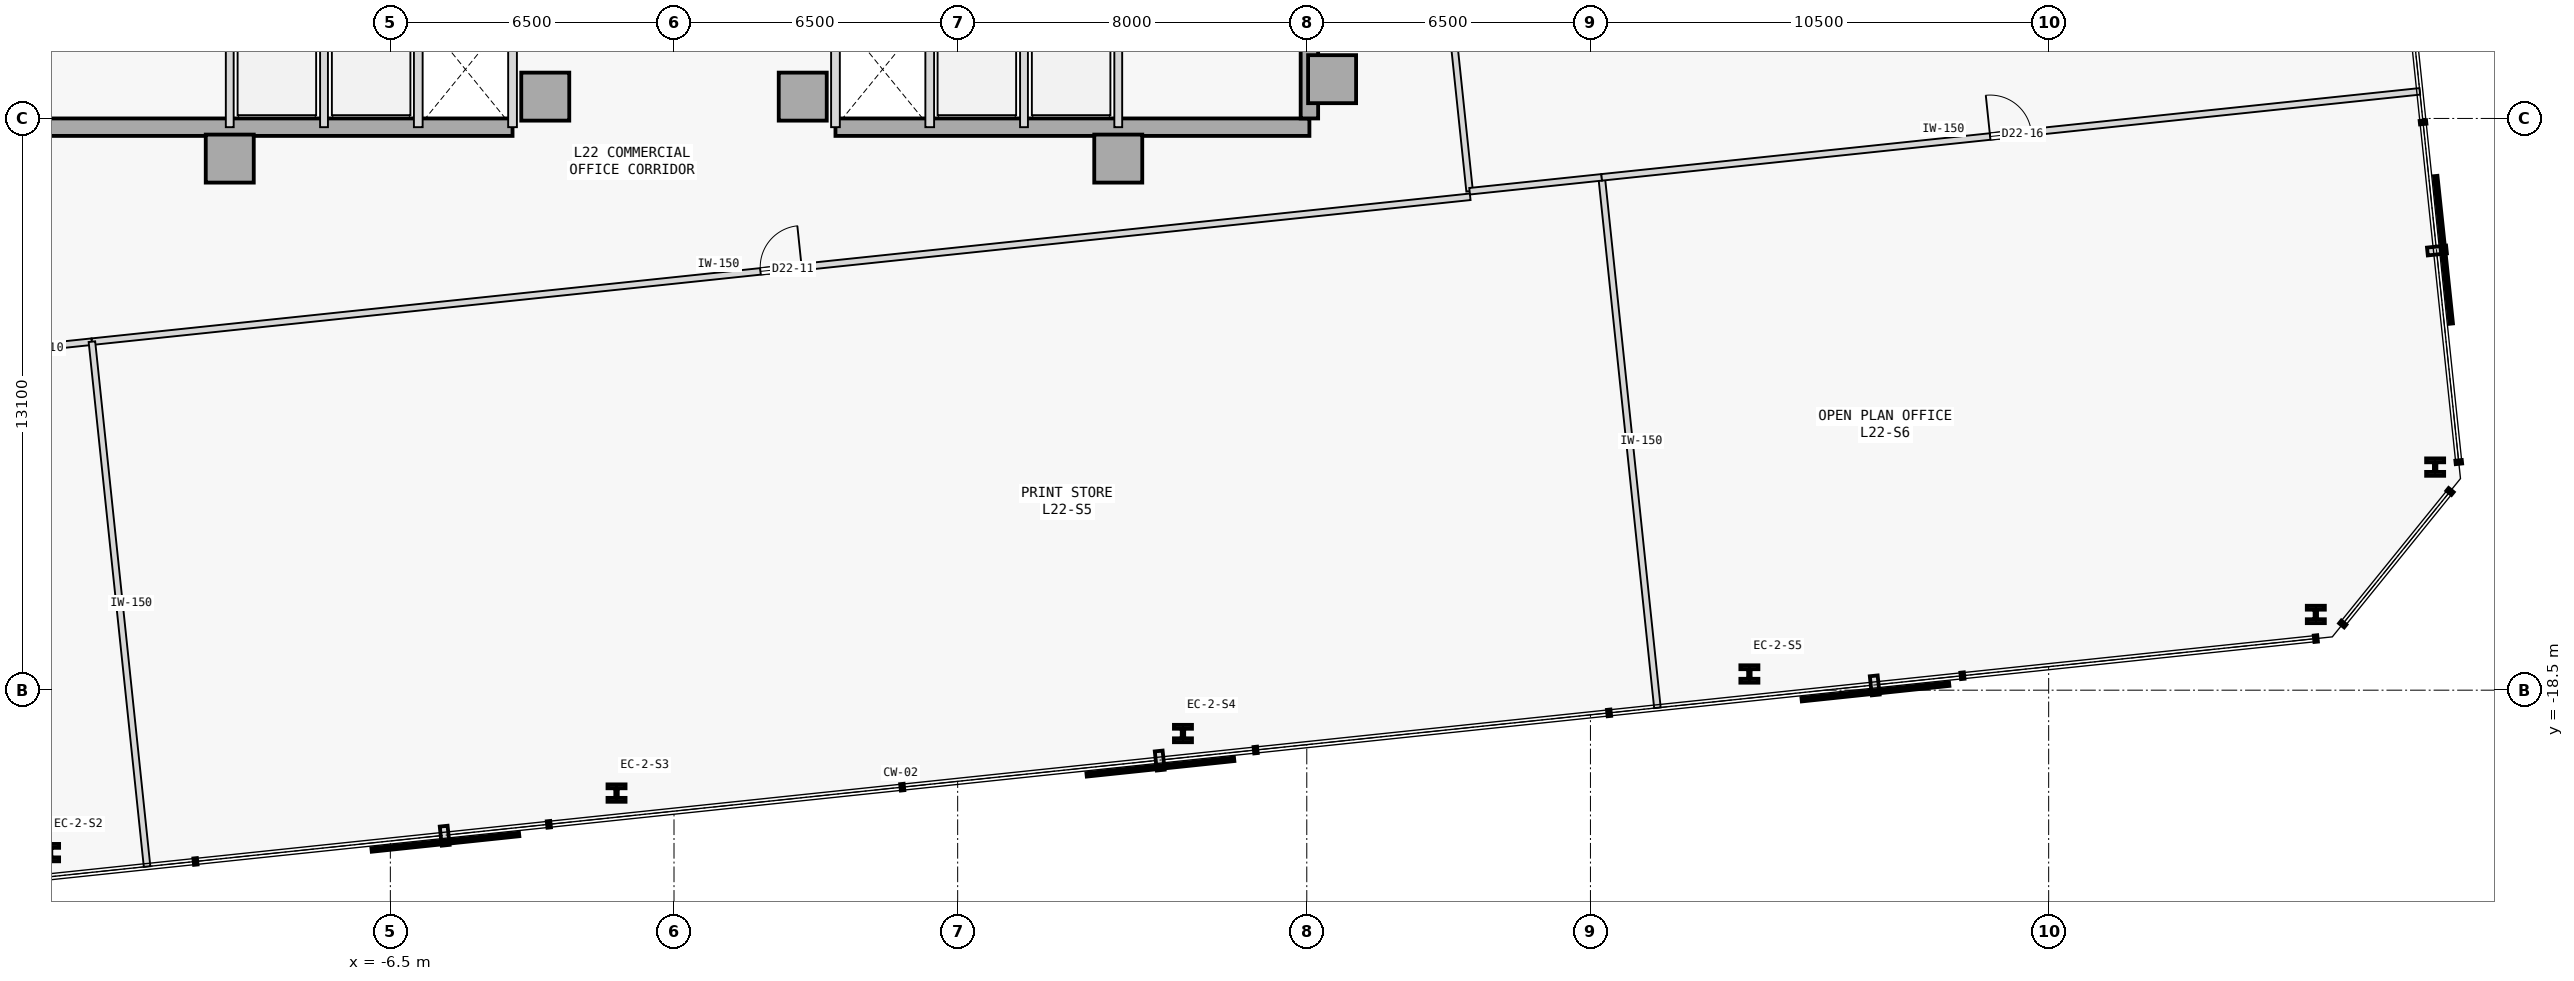
"""IFC4 building model, lengths in metres.
Left out: names, types, materials, properties, quantities, classifications, styles, units other than length and angle.
Written with IfcOpenShell. Run it as: python <this file> out.ifc"""

import sys

from ifc_helpers import new_model, si_unit, direction, frame, frame_2d, origin, origin_2d, place, context, subcontext, project, spatial, rectangle, i_section, extrude, element, fill, save


model = new_model("IFC4")
c1 = context("Model", 3, precision=1e-05, world=origin(), true_north=direction((0.0, 1.0)))
c2 = subcontext(c1, "Body", "Model", "MODEL_VIEW")
j1 = project(units=[si_unit("LENGTHUNIT", "METRE"), si_unit("PLANEANGLEUNIT", "RADIAN")], contexts=[c1])
p1 = place(None, origin())
s1 = spatial("IfcSite", under=j1, at=p1, CompositionType="ELEMENT")
p2 = place(p1, origin())
s2 = spatial("IfcBuilding", under=s1, at=p2, CompositionType="ELEMENT")
p3 = place(p2, frame((0.0, 0.0, 91.1)))
s3 = spatial("IfcBuildingStorey", under=s2, at=p3, CompositionType="ELEMENT", Elevation=91.1)
for number, where, z_axis, x_axis in (
    (1, (-10.18, -6.32, 0.0), (0.0, 0.0, 1.0), (1.0, 0.0, 0.0)),
    (2, (-2.95, -4.9, 0.0), (0.0, 0.0, 1.0), (1.0, 0.0, 0.0)),
    (3, (15.08, -4.5, 0.0), (0.0, 0.0, 1.0), (1.0, 0.0, 0.0)),
    (4, (10.18, -6.32, 0.0), (0.0, 0.0, 1.0), (1.0, 0.0, 0.0)),
    (5, (2.95, -4.9, 0.0), (0.0, 0.0, 1.0), (1.0, 0.0, 0.0)),
):
    element("IfcColumn", number, at=place(p3, frame(where, z_axis=z_axis, x_axis=x_axis)), inside=s3, PredefinedType="COLUMN", context=c2, shape_type="SweptSolid", body=[
        extrude(rectangle(XDim=1.1, YDim=1.1, at=origin_2d()), origin(), (0.0, 0.0, 1.0), 3.7),
    ])
for number, where, z_axis, x_axis in (
    (6, (-14.56, -5.6, 0.0), (0.0, 0.0, 1.0), (1.0, 0.0, 0.0)),
    (7, (3.7, -5.6, 0.0), (0.0, 0.0, 1.0), (1.0, 0.0, 0.0)),
):
    element("IfcWall", number, at=place(p3, frame(where, z_axis=z_axis, x_axis=x_axis)), inside=s3, PredefinedType="SHEAR", context=c2, shape_type="SweptSolid", body=[
        extrude(rectangle(XDim=10.86, YDim=0.4, at=frame_2d((5.43, 0.0))), origin(), (0.0, 0.0, 1.0), 3.475),
    ])
p4 = place(p3, frame((14.56, -5.4, 0.0), z_axis=(0.0, 0.0, 1.0), x_axis=(0.0, 1.0, 0.0)))
e8 = element("IfcWall", 8, at=p4, inside=s3, PredefinedType="SHEAR", context=c2, shape_type="SweptSolid", body=[
    extrude(rectangle(XDim=10.8, YDim=0.4, at=frame_2d((5.4, 0.0))), origin(), (0.0, 0.0, 1.0), 3.475),
])
for number, where, z_axis, x_axis in (
    (9, (-14.297, -22.222, 0.0), (0.0, 0.0, 1.0), (1.0, 0.0, 0.0)),
    (10, (-1.317, -20.858, 0.0), (0.0, 0.0, 1.0), (1.0, 0.0, 0.0)),
    (11, (11.663, -19.494, 0.0), (0.0, 0.0, 1.0), (1.0, 0.0, 0.0)),
    (12, (24.642, -18.129, 0.0), (0.0, 0.0, 1.0), (1.0, 0.0, 0.0)),
    (13, (37.622, -16.765, 0.0), (0.0, 0.0, 1.0), (1.0, 0.0, 0.0)),
    (14, (40.356, -13.389, 0.0), (0.0, 0.0, 1.0), (1.0, 0.0, 0.0)),
):
    element("IfcColumn", number, at=place(p3, frame(where, z_axis=z_axis, x_axis=x_axis)), inside=s3, PredefinedType="COLUMN", context=c2, shape_type="SweptSolid", body=[
        extrude(i_section(OverallWidth=0.413, OverallDepth=0.398, WebThickness=0.056, FlangeThickness=0.089, FilletRadius=0.015, at=origin_2d()), origin(), (0.0, 0.0, 1.0), 3.7),
    ])
for number, where, z_axis, x_axis in (
    (15, (-3.7, -5.6, 0.0), (0.0, 0.0, 1.0), (0.0, 1.0, 0.0)),
    (16, (-5.86, -5.6, 0.0), (0.0, 0.0, 1.0), (0.0, 1.0, 0.0)),
):
    element("IfcWall", number, at=place(p3, frame(where, z_axis=z_axis, x_axis=x_axis)), inside=s3, PredefinedType="STANDARD", context=c2, shape_type="SweptSolid", body=[
        extrude(rectangle(XDim=2.65, YDim=0.2, at=frame_2d((1.325, 0.0))), origin(), (0.0, 0.0, 1.0), 3.475),
    ])
for number, where, z_axis, x_axis in (
    (17, (-10.18, -5.6, 0.0), (0.0, 0.0, 1.0), (0.0, 1.0, 0.0)),
    (18, (-8.02, -5.6, 0.0), (0.0, 0.0, 1.0), (0.0, 1.0, 0.0)),
):
    element("IfcWall", number, at=place(p3, frame(where, z_axis=z_axis, x_axis=x_axis)), inside=s3, PredefinedType="STANDARD", context=c2, shape_type="SweptSolid", body=[
        extrude(rectangle(XDim=2.65, YDim=0.18, at=frame_2d((1.325, 0.0))), origin(), (0.0, 0.0, 1.0), 3.475),
    ])
for number, where, z_axis, x_axis in (
    (19, (3.7, -5.6, 0.0), (0.0, 0.0, 1.0), (0.0, 1.0, 0.0)),
    (20, (5.86, -5.6, 0.0), (0.0, 0.0, 1.0), (0.0, 1.0, 0.0)),
):
    element("IfcWall", number, at=place(p3, frame(where, z_axis=z_axis, x_axis=x_axis)), inside=s3, PredefinedType="STANDARD", context=c2, shape_type="SweptSolid", body=[
        extrude(rectangle(XDim=2.65, YDim=0.2, at=frame_2d((1.325, 0.0))), origin(), (0.0, 0.0, 1.0), 3.475),
    ])
for number, where, z_axis, x_axis in (
    (21, (10.18, -5.6, 0.0), (0.0, 0.0, 1.0), (0.0, 1.0, 0.0)),
    (22, (8.02, -5.6, 0.0), (0.0, 0.0, 1.0), (0.0, 1.0, 0.0)),
):
    element("IfcWall", number, at=place(p3, frame(where, z_axis=z_axis, x_axis=x_axis)), inside=s3, PredefinedType="STANDARD", context=c2, shape_type="SweptSolid", body=[
        extrude(rectangle(XDim=2.65, YDim=0.18, at=frame_2d((1.325, 0.0))), origin(), (0.0, 0.0, 1.0), 3.475),
    ])
p5 = place(p3, frame((-16.14, -10.809, 0.0), z_axis=(0.0, 0.0, 1.0), x_axis=(0.994522535937, 0.104522368483, 0.0)))
e23 = element("IfcWall", 23, at=p5, inside=s3, PredefinedType="PARTITIONING", context=c2, shape_type="SweptSolid", body=[
    extrude(rectangle(XDim=2.817, YDim=0.15, at=frame_2d((1.408, 0.0))), origin(), (0.0, 0.0, 1.0), 3.475),
])
p6 = place(p5, frame((0.934, 0.0, 0.0)))
e24 = element("IfcOpeningElement", 24, at=p6, cuts=e23, PredefinedType="OPENING", context=c2, shape_type="SweptSolid", body=[
    extrude(rectangle(XDim=0.95, YDim=2.15, at=frame_2d((0.475, 1.075))), frame((0.0, 0.085, 0.0), z_axis=(0.0, -1.0, 0.0), x_axis=(1.0, 0.0, 0.0)), (0.0, 0.0, 1.0), 0.17),
])
p7 = place(p3, frame((-13.338, -10.515, 0.0), z_axis=(0.0, 0.0, 1.0), x_axis=(0.994522458216, 0.104523107989, 0.0)))
e25 = element("IfcWall", 25, at=p7, inside=s3, PredefinedType="PARTITIONING", context=c2, shape_type="SweptSolid", body=[
    extrude(rectangle(XDim=31.757, YDim=0.15, at=frame_2d((15.878, 0.0))), origin(), (0.0, 0.0, 1.0), 3.475),
])
p8 = place(p7, frame((15.404, 0.0, 0.0)))
e26 = element("IfcOpeningElement", 26, at=p8, cuts=e25, PredefinedType="OPENING", context=c2, shape_type="SweptSolid", body=[
    extrude(rectangle(XDim=0.95, YDim=2.15, at=frame_2d((0.475, 1.075))), frame((0.0, 0.085, 0.0), z_axis=(0.0, -1.0, 0.0), x_axis=(1.0, 0.0, 0.0)), (0.0, 0.0, 1.0), 0.17),
])
p9 = place(p3, frame((18.231, -7.068, 0.0), z_axis=(0.0, 0.0, 1.0), x_axis=(-0.104536082083, 0.994521094569, 0.0)))
e27 = element("IfcWall", 27, at=p9, inside=s3, PredefinedType="PARTITIONING", context=c2, shape_type="SweptSolid", body=[
    extrude(rectangle(XDim=11.794, YDim=0.15, at=frame_2d((5.897, 0.0))), origin(), (0.0, 0.0, 1.0), 3.475),
])
p10 = place(p9, frame((5.422, 0.0, 0.0)))
e28 = element("IfcOpeningElement", 28, at=p10, cuts=e27, PredefinedType="OPENING", context=c2, shape_type="SweptSolid", body=[
    extrude(rectangle(XDim=0.95, YDim=2.15, at=frame_2d((0.475, 1.075))), frame((0.0, 0.085, 0.0), z_axis=(0.0, -1.0, 0.0), x_axis=(1.0, 0.0, 0.0)), (0.0, 0.0, 1.0), 0.17),
])
p11 = place(p3, frame((-12.074, -22.542, 0.0), z_axis=(0.0, 0.0, 1.0), x_axis=(-0.104515587229, 0.99452324861, 0.0)))
e29 = element("IfcWall", 29, at=p11, inside=s3, PredefinedType="PARTITIONING", context=c2, shape_type="SweptSolid", body=[
    extrude(rectangle(XDim=12.093, YDim=0.15, at=frame_2d((6.046, 0.0))), origin(), (0.0, 0.0, 1.0), 3.475),
])
p12 = place(p3, frame((22.535, -18.904, 0.0), z_axis=(0.0, 0.0, 1.0), x_axis=(-0.104520477826, 0.99452273464, 0.0)))
e30 = element("IfcWall", 30, at=p12, inside=s3, PredefinedType="PARTITIONING", context=c2, shape_type="SweptSolid", body=[
    extrude(rectangle(XDim=12.221, YDim=0.15, at=frame_2d((6.11, 0.0))), origin(), (0.0, 0.0, 1.0), 3.475),
])
p13 = place(p3, frame((18.231, -7.068, 0.0), z_axis=(0.0, 0.0, 1.0), x_axis=(0.994520828596, 0.104538612428, 0.0)))
e31 = element("IfcWall", 31, at=p13, inside=s3, PredefinedType="PARTITIONING", context=c2, shape_type="SweptSolid", body=[
    extrude(rectangle(XDim=3.043, YDim=0.15, at=frame_2d((1.521, 0.0))), origin(), (0.0, 0.0, 1.0), 3.475),
])
p14 = place(p3, frame((21.258, -6.75, 0.0), z_axis=(0.0, 0.0, 1.0), x_axis=(0.994521409189, 0.104533088851, 0.0)))
e32 = element("IfcWall", 32, at=p14, inside=s3, PredefinedType="PARTITIONING", context=c2, shape_type="SweptSolid", body=[
    extrude(rectangle(XDim=18.85, YDim=0.15, at=frame_2d((9.425, 0.0))), origin(), (0.0, 0.0, 1.0), 3.475),
])
p15 = place(p14, frame((8.95, 0.0, 0.0)))
e33 = element("IfcOpeningElement", 33, at=p15, cuts=e32, PredefinedType="OPENING", context=c2, shape_type="SweptSolid", body=[
    extrude(rectangle(XDim=0.95, YDim=2.15, at=frame_2d((0.475, 1.075))), frame((0.0, 0.085, 0.0), z_axis=(0.0, -1.0, 0.0), x_axis=(1.0, 0.0, 0.0)), (0.0, 0.0, 1.0), 0.17),
])
p16 = place(p8, origin())
e34 = element("IfcDoor", 34, at=p16, inside=s3, OperationType="SINGLE_SWING_RIGHT", PredefinedType="DOOR", context=c2, shape_type="SweptSolid", body=[
    extrude(rectangle(XDim=0.95, YDim=2.15, at=frame_2d((0.475, 1.075))), frame((0.0, 0.025, 0.0), z_axis=(0.0, -1.0, 0.0), x_axis=(1.0, 0.0, 0.0)), (0.0, 0.0, 1.0), 0.05),
])
fill(e26, e34)
p17 = place(p15, origin())
e35 = element("IfcDoor", 35, at=p17, inside=s3, OperationType="SINGLE_SWING_LEFT", PredefinedType="DOOR", context=c2, shape_type="SweptSolid", body=[
    extrude(rectangle(XDim=0.95, YDim=2.15, at=frame_2d((0.475, 1.075))), frame((0.0, 0.025, 0.0), z_axis=(0.0, -1.0, 0.0), x_axis=(1.0, 0.0, 0.0)), (0.0, 0.0, 1.0), 0.05),
])
fill(e33, e35)
save(model, sys.argv[1])
